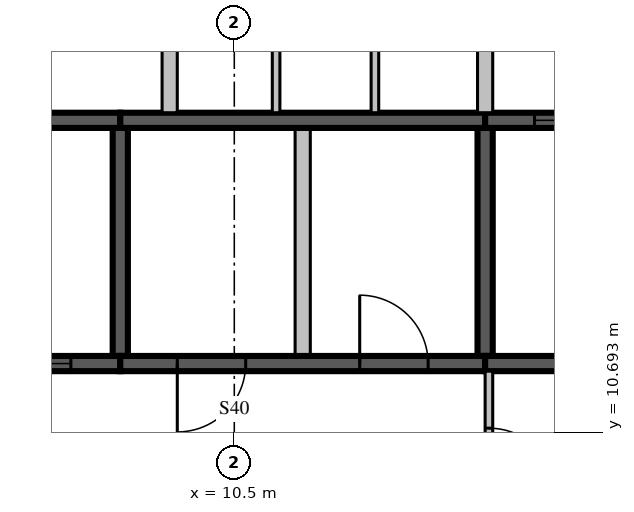
"""IFC4 building model, lengths in metres.
Left out: names, types, materials, properties, quantities, classifications, styles, units other than length and angle.
Written with IfcOpenShell. Run it as: python <this file> out.ifc"""

import sys

from ifc_helpers import new_model, si_unit, direction, frame, frame_2d, origin, place, context, subcontext, project, spatial, rectangle, extrude, source, transform, mapped, element, fill, save


model = new_model("IFC4")
c1 = context("Model", 3, precision=1e-05, world=origin(), true_north=direction((0.0, 1.0)))
c2 = subcontext(c1, "Body", "Model", "MODEL_VIEW")
j1 = project(units=[si_unit("LENGTHUNIT", "METRE"), si_unit("PLANEANGLEUNIT", "RADIAN")], contexts=[c1])
p1 = place(None, origin())
s1 = spatial("IfcSite", under=j1, at=p1, CompositionType="ELEMENT")
p2 = place(p1, origin())
s2 = spatial("IfcBuilding", under=s1, at=p2, CompositionType="ELEMENT")
p3 = place(p2, frame((0.0, 0.0, 319.5)))
s3 = spatial("IfcBuildingStorey", under=s2, at=p3, CompositionType="ELEMENT", Elevation=319.5)
m1 = source(origin(), c2, "Body", "SweptSolid", [
    extrude(rectangle(XDim=3.0, YDim=0.2, at=frame_2d((1.5, 0.0))), origin(), (0.0, 0.0, 1.0), 3.1),
])
for number, where, z_axis, x_axis in (
    (1, (9.0, 11.7, 0.0), (0.0, 0.0, 1.0), (0.0, 1.0, 0.0)),
    (2, (13.8, 11.7, 0.0), (0.0, 0.0, 1.0), (0.0, 1.0, 0.0)),
):
    element("IfcWall", number, at=place(p3, frame(where, z_axis=z_axis, x_axis=x_axis)), inside=s3, PredefinedType="SOLIDWALL", context=c2, shape_type="MappedRepresentation", body=[
        mapped(m1, transform((0.0, 0.0, 0.0), scale=1.0)),
    ])
m2 = source(origin(), c2, "Body", "SweptSolid", [
    extrude(rectangle(XDim=3.0, YDim=0.2, at=frame_2d((1.5, 0.0))), origin(), (0.0, 0.0, 1.0), 3.1),
])
p4 = place(p3, frame((11.4, 11.7, 0.0), z_axis=(0.0, 0.0, 1.0), x_axis=(0.0, 1.0, 0.0)))
e3 = element("IfcWall", 3, at=p4, inside=s3, PredefinedType="PARTITIONING", context=c2, shape_type="MappedRepresentation", body=[
    mapped(m2, transform((0.0, 0.0, 0.0), scale=1.0)),
])
m3 = source(origin(), c2, "Body", "SweptSolid", [
    extrude(rectangle(XDim=4.8, YDim=0.2, at=frame_2d((2.4, 0.0))), origin(), (0.0, 0.0, 1.0), 3.5),
])
p5 = place(p3, frame((4.2, 11.6, 0.0), z_axis=(0.0, 0.0, 1.0), x_axis=(1.0, 0.0, 0.0)))
e4 = element("IfcWall", 4, at=p5, inside=s3, PredefinedType="SOLIDWALL", context=c2, shape_type="MappedRepresentation", body=[
    mapped(m3, transform((0.0, 0.0, 0.0), scale=1.0)),
])
m4 = source(origin(), c2, "Body", "SweptSolid", [
    extrude(rectangle(XDim=1.1, YDim=2.1, at=frame_2d((0.55, 1.05))), frame((0.0, 0.11, 0.0), z_axis=(0.0, -1.0, 0.0), x_axis=(1.0, 0.0, 0.0)), (0.0, 0.0, 1.0), 0.22),
])
p6 = place(p5, frame((0.65, 0.0, 0.0)))
e5 = element("IfcOpeningElement", 5, at=p6, cuts=e4, PredefinedType="OPENING", context=c2, shape_type="MappedRepresentation", body=[
    mapped(m4, transform((0.0, 0.0, 0.0), scale=1.0)),
])
p7 = place(p5, frame((3.05, 0.0, 0.0)))
e6 = element("IfcOpeningElement", 6, at=p7, cuts=e4, PredefinedType="OPENING", context=c2, shape_type="MappedRepresentation", body=[
    mapped(m4, transform((0.0, 0.0, 0.0), scale=1.0)),
])
m5 = source(origin(), c2, "Body", "SweptSolid", [
    extrude(rectangle(XDim=4.8, YDim=0.2, at=frame_2d((2.4, 0.0))), origin(), (0.0, 0.0, 1.0), 3.1),
])
p8 = place(p3, frame((9.0, 11.6, 0.0), z_axis=(0.0, 0.0, 1.0), x_axis=(1.0, 0.0, 0.0)))
e7 = element("IfcWall", 7, at=p8, inside=s3, PredefinedType="SOLIDWALL", context=c2, shape_type="MappedRepresentation", body=[
    mapped(m5, transform((0.0, 0.0, 0.0), scale=1.0)),
])
m6 = source(origin(), c2, "Body", "SweptSolid", [
    extrude(rectangle(XDim=0.9, YDim=2.1, at=frame_2d((0.45, 1.05))), frame((0.0, 0.11, 0.0), z_axis=(0.0, -1.0, 0.0), x_axis=(1.0, 0.0, 0.0)), (0.0, 0.0, 1.0), 0.22),
])
p9 = place(p8, frame((0.75, 0.0, 0.0)))
e8 = element("IfcOpeningElement", 8, at=p9, cuts=e7, PredefinedType="OPENING", context=c2, shape_type="MappedRepresentation", body=[
    mapped(m6, transform((0.0, 0.0, 0.0), scale=1.0)),
])
p10 = place(p8, frame((3.15, 0.0, 0.0)))
e9 = element("IfcOpeningElement", 9, at=p10, cuts=e7, PredefinedType="OPENING", context=c2, shape_type="MappedRepresentation", body=[
    mapped(m6, transform((0.0, 0.0, 0.0), scale=1.0)),
])
m7 = source(origin(), c2, "Body", "SweptSolid", [
    extrude(rectangle(XDim=7.2, YDim=0.2, at=frame_2d((3.6, 0.0))), origin(), (0.0, 0.0, 1.0), 3.5),
])
p11 = place(p3, frame((13.8, 11.6, 0.0), z_axis=(0.0, 0.0, 1.0), x_axis=(1.0, 0.0, 0.0)))
e10 = element("IfcWall", 10, at=p11, inside=s3, PredefinedType="SOLIDWALL", context=c2, shape_type="MappedRepresentation", body=[
    mapped(m7, transform((0.0, 0.0, 0.0), scale=1.0)),
])
p12 = place(p3, frame((4.2, 14.8, 0.0), z_axis=(0.0, 0.0, 1.0), x_axis=(1.0, 0.0, 0.0)))
e11 = element("IfcWall", 11, at=p12, inside=s3, PredefinedType="SOLIDWALL", context=c2, shape_type="MappedRepresentation", body=[
    mapped(m3, transform((0.0, 0.0, 0.0), scale=1.0)),
])
p13 = place(p3, frame((9.0, 14.8, 0.0), z_axis=(0.0, 0.0, 1.0), x_axis=(1.0, 0.0, 0.0)))
e12 = element("IfcWall", 12, at=p13, inside=s3, PredefinedType="SOLIDWALL", context=c2, shape_type="MappedRepresentation", body=[
    mapped(m5, transform((0.0, 0.0, 0.0), scale=1.0)),
])
p14 = place(p3, frame((13.8, 14.8, 0.0), z_axis=(0.0, 0.0, 1.0), x_axis=(1.0, 0.0, 0.0)))
e13 = element("IfcWall", 13, at=p14, inside=s3, PredefinedType="SOLIDWALL", context=c2, shape_type="MappedRepresentation", body=[
    mapped(m7, transform((0.0, 0.0, 0.0), scale=1.0)),
])
p15 = place(p14, frame((0.65, 0.0, 0.0)))
e14 = element("IfcOpeningElement", 14, at=p15, cuts=e13, PredefinedType="OPENING", context=c2, shape_type="MappedRepresentation", body=[
    mapped(m4, transform((0.0, 0.0, 0.0), scale=1.0)),
])
p16 = place(p14, frame((3.05, 0.0, 0.0)))
e15 = element("IfcOpeningElement", 15, at=p16, cuts=e13, PredefinedType="OPENING", context=c2, shape_type="MappedRepresentation", body=[
    mapped(m4, transform((0.0, 0.0, 0.0), scale=1.0)),
])
p17 = place(p14, frame((5.45, 0.0, 0.0)))
e16 = element("IfcOpeningElement", 16, at=p17, cuts=e13, PredefinedType="OPENING", context=c2, shape_type="MappedRepresentation", body=[
    mapped(m4, transform((0.0, 0.0, 0.0), scale=1.0)),
])
p18 = place(p3, frame((9.65, 14.9, 0.0), z_axis=(0.0, 0.0, 1.0), x_axis=(0.0, 1.0, 0.0)))
e17 = element("IfcWall", 17, at=p18, inside=s3, PredefinedType="PARTITIONING", context=c2, shape_type="MappedRepresentation", body=[
    mapped(m2, transform((0.0, 0.0, 0.0), scale=1.0)),
])
m8 = source(origin(), c2, "Body", "SweptSolid", [
    extrude(rectangle(XDim=2.5, YDim=0.1, at=frame_2d((1.25, 0.0))), origin(), (0.0, 0.0, 1.0), 3.1),
])
p19 = place(p3, frame((13.85, 9.0, 0.0), z_axis=(0.0, 0.0, 1.0), x_axis=(0.0, 1.0, 0.0)))
e18 = element("IfcWall", 18, at=p19, inside=s3, PredefinedType="PARTITIONING", context=c2, shape_type="MappedRepresentation", body=[
    mapped(m8, transform((0.0, 0.0, 0.0), scale=1.0)),
])
m9 = source(origin(), c2, "Body", "SweptSolid", [
    extrude(rectangle(XDim=0.9, YDim=2.1, at=frame_2d((0.45, 1.05))), frame((0.0, 0.06, 0.0), z_axis=(0.0, -1.0, 0.0), x_axis=(1.0, 0.0, 0.0)), (0.0, 0.0, 1.0), 0.12),
])
p20 = place(p19, frame((0.85, 0.0, 0.0)))
e19 = element("IfcOpeningElement", 19, at=p20, cuts=e18, PredefinedType="OPENING", context=c2, shape_type="MappedRepresentation", body=[
    mapped(m9, transform((0.0, 0.0, 0.0), scale=1.0)),
])
p21 = place(p3, frame((13.8, 14.9, 0.0), z_axis=(0.0, 0.0, 1.0), x_axis=(0.0, 1.0, 0.0)))
e20 = element("IfcWall", 20, at=p21, inside=s3, PredefinedType="PARTITIONING", context=c2, shape_type="MappedRepresentation", body=[
    mapped(m2, transform((0.0, 0.0, 0.0), scale=1.0)),
])
m10 = source(origin(), c2, "Body", "SweptSolid", [
    extrude(rectangle(XDim=3.0, YDim=0.1, at=frame_2d((1.5, 0.0))), origin(), (0.0, 0.0, 1.0), 3.1),
])
for number, where, z_axis, x_axis in (
    (21, (11.05, 14.9, 0.0), (0.0, 0.0, 1.0), (0.0, 1.0, 0.0)),
    (22, (12.35, 14.9, 0.0), (0.0, 0.0, 1.0), (0.0, 1.0, 0.0)),
):
    element("IfcWall", number, at=place(p3, frame(where, z_axis=z_axis, x_axis=x_axis)), inside=s3, PredefinedType="PARTITIONING", context=c2, shape_type="MappedRepresentation", body=[
        mapped(m10, transform((0.0, 0.0, 0.0), scale=1.0)),
    ])
m11 = source(origin(), c2, "Body", "SweptSolid", [
    extrude(rectangle(XDim=1.1, YDim=2.1, at=frame_2d((0.55, 1.05))), frame((0.0, 0.025, 0.0), z_axis=(0.0, -1.0, 0.0), x_axis=(1.0, 0.0, 0.0)), (0.0, 0.0, 1.0), 0.05),
])
p22 = place(p7, origin())
e23 = element("IfcDoor", 23, at=p22, inside=s3, OperationType="SLIDING_TO_LEFT", PredefinedType="DOOR", context=c2, shape_type="MappedRepresentation", body=[
    mapped(m11, transform((0.0, 0.0, 0.0), scale=1.0)),
])
fill(e6, e23)
m12 = source(origin(), c2, "Body", "SweptSolid", [
    extrude(rectangle(XDim=0.9, YDim=2.1, at=frame_2d((0.45, 1.05))), frame((0.0, 0.025, 0.0), z_axis=(0.0, -1.0, 0.0), x_axis=(1.0, 0.0, 0.0)), (0.0, 0.0, 1.0), 0.05),
])
p23 = place(p9, origin())
e24 = element("IfcDoor", 24, at=p23, inside=s3, OperationType="SINGLE_SWING_RIGHT", PredefinedType="DOOR", context=c2, shape_type="MappedRepresentation", body=[
    mapped(m12, transform((0.0, 0.0, 0.0), scale=1.0)),
])
fill(e8, e24)
p24 = place(p10, origin())
e25 = element("IfcDoor", 25, at=p24, inside=s3, OperationType="SINGLE_SWING_LEFT", PredefinedType="DOOR", context=c2, shape_type="MappedRepresentation", body=[
    mapped(m12, transform((0.0, 0.0, 0.0), scale=1.0)),
])
fill(e9, e25)
p25 = place(p15, origin())
e26 = element("IfcDoor", 26, at=p25, inside=s3, OperationType="SLIDING_TO_LEFT", PredefinedType="DOOR", context=c2, shape_type="MappedRepresentation", body=[
    mapped(m11, transform((0.0, 0.0, 0.0), scale=1.0)),
])
fill(e14, e26)
p26 = place(p20, origin())
e27 = element("IfcDoor", 27, at=p26, inside=s3, OperationType="SINGLE_SWING_RIGHT", PredefinedType="DOOR", context=c2, shape_type="MappedRepresentation", body=[
    mapped(m12, transform((0.0, 0.0, 0.0), scale=1.0)),
])
fill(e19, e27)
save(model, sys.argv[1])
